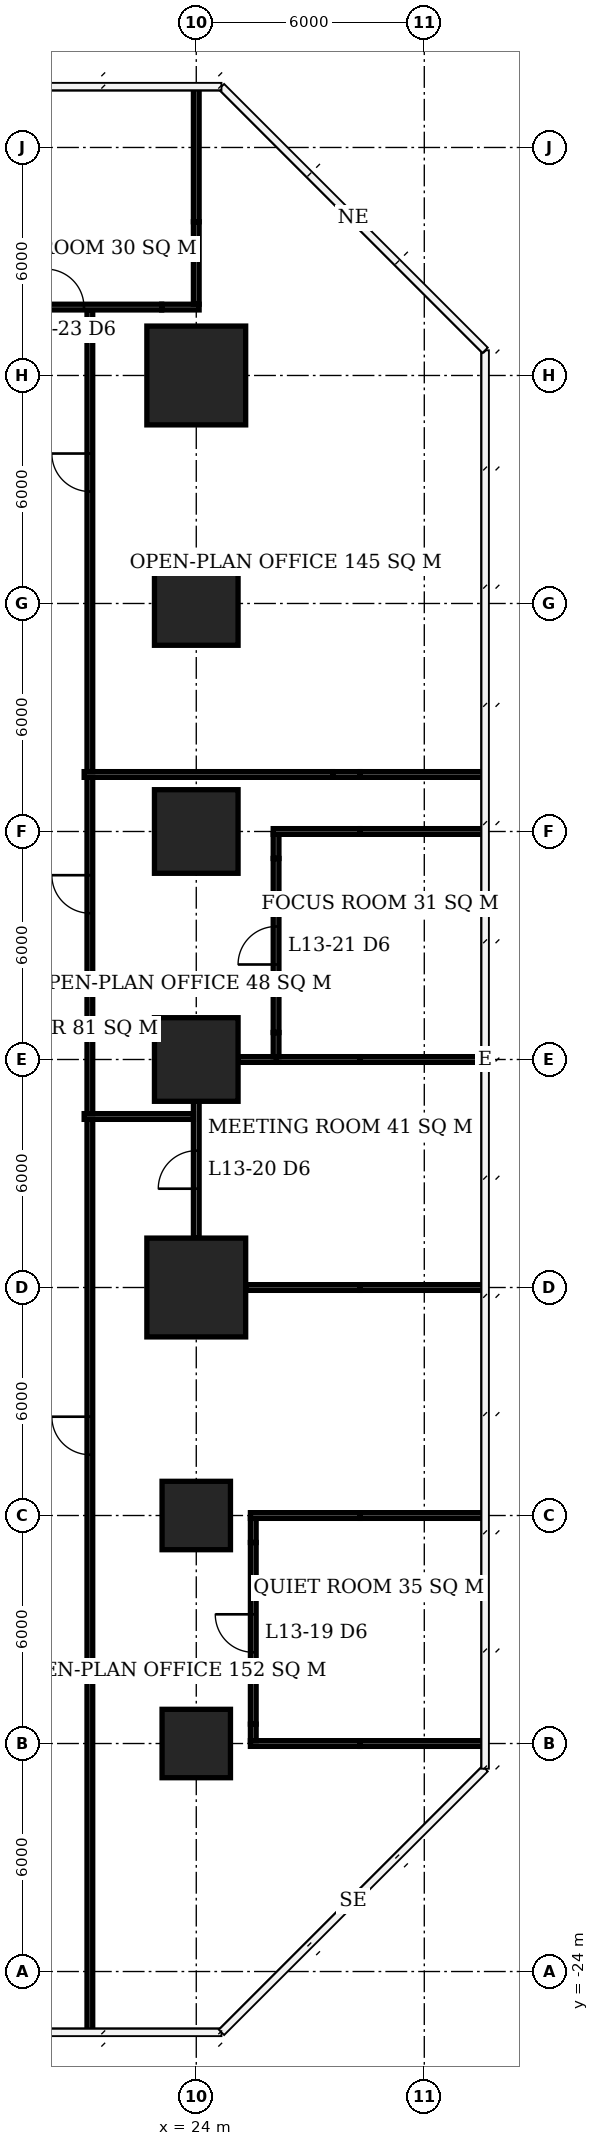
"""IFC4 building model, lengths in metres.
Left out: names, types, materials, properties, quantities, classifications, styles, units other than length and angle.
Written with IfcOpenShell. Run it as: python <this file> out.ifc"""

import sys

from ifc_helpers import new_model, si_unit, direction, frame, frame_2d, origin, origin_2d, place, context, subcontext, project, spatial, rectangle, extrude, element, fill, save


model = new_model("IFC4")
c1 = context("Model", 3, precision=1e-05, world=origin(), true_north=direction((0.0, 1.0)))
c2 = subcontext(c1, "Body", "Model", "MODEL_VIEW")
j1 = project(units=[si_unit("LENGTHUNIT", "METRE"), si_unit("PLANEANGLEUNIT", "RADIAN")], contexts=[c1])
p1 = place(None, origin())
s1 = spatial("IfcSite", under=j1, at=p1, CompositionType="ELEMENT")
p2 = place(p1, origin())
s2 = spatial("IfcBuilding", under=s1, at=p2, CompositionType="ELEMENT")
p3 = place(p2, frame((0.0, 0.0, 57.2)))
s3 = spatial("IfcBuildingStorey", under=s2, at=p3, CompositionType="ELEMENT", Elevation=57.2)
for number, where, z_axis, x_axis in (
    (1, (24.0, -18.0, 0.0), (0.0, 0.0, 1.0), (1.0, 0.0, 0.0)),
    (2, (24.0, -12.0, 0.0), (0.0, 0.0, 1.0), (1.0, 0.0, 0.0)),
):
    element("IfcColumn", number, at=place(p3, frame(where, z_axis=z_axis, x_axis=x_axis)), inside=s3, PredefinedType="COLUMN", context=c2, shape_type="SweptSolid", body=[
        extrude(rectangle(XDim=1.8, YDim=1.8, at=origin_2d()), origin(), (0.0, 0.0, 1.0), 3.9),
    ])
p4 = place(p3, frame((24.0, -6.0, 0.0), z_axis=(0.0, 0.0, 1.0), x_axis=(1.0, 0.0, 0.0)))
e3 = element("IfcColumn", 3, at=p4, inside=s3, PredefinedType="COLUMN", context=c2, shape_type="SweptSolid", body=[
    extrude(rectangle(XDim=2.6, YDim=2.6, at=origin_2d()), origin(), (0.0, 0.0, 1.0), 3.9),
])
for number, where, z_axis, x_axis in (
    (4, (24.0, 0.0, 0.0), (0.0, 0.0, 1.0), (1.0, 0.0, 0.0)),
    (5, (24.0, 6.0, 0.0), (0.0, 0.0, 1.0), (1.0, 0.0, 0.0)),
    (6, (24.0, 12.0, 0.0), (0.0, 0.0, 1.0), (1.0, 0.0, 0.0)),
):
    element("IfcColumn", number, at=place(p3, frame(where, z_axis=z_axis, x_axis=x_axis)), inside=s3, PredefinedType="COLUMN", context=c2, shape_type="SweptSolid", body=[
        extrude(rectangle(XDim=2.2, YDim=2.2, at=origin_2d()), origin(), (0.0, 0.0, 1.0), 3.9),
    ])
p5 = place(p3, frame((24.0, 18.0, 0.0), z_axis=(0.0, 0.0, 1.0), x_axis=(1.0, 0.0, 0.0)))
e7 = element("IfcColumn", 7, at=p5, inside=s3, PredefinedType="COLUMN", context=c2, shape_type="SweptSolid", body=[
    extrude(rectangle(XDim=2.6, YDim=2.6, at=origin_2d()), origin(), (0.0, 0.0, 1.0), 3.9),
])
p6 = place(p3, frame((25.425, -18.0, 0.0), z_axis=(0.0, 0.0, 1.0), x_axis=(1.0, 0.0, 0.0)))
e8 = element("IfcWall", 8, at=p6, inside=s3, PredefinedType="PARTITIONING", context=c2, shape_type="SweptSolid", body=[
    extrude(rectangle(XDim=2.885, YDim=0.15, at=frame_2d((1.442, 0.0))), origin(), (0.0, 0.0, 1.0), 2.65),
])
p7 = place(p3, frame((28.31, -18.0, 0.0), z_axis=(0.0, 0.0, 1.0), x_axis=(1.0, 0.0, 0.0)))
e9 = element("IfcWall", 9, at=p7, inside=s3, PredefinedType="PARTITIONING", context=c2, shape_type="SweptSolid", body=[
    extrude(rectangle(XDim=3.29, YDim=0.15, at=frame_2d((1.645, 0.0))), origin(), (0.0, 0.0, 1.0), 3.65),
])
p8 = place(p3, frame((25.425, -12.0, 0.0), z_axis=(0.0, 0.0, 1.0), x_axis=(1.0, 0.0, 0.0)))
e10 = element("IfcWall", 10, at=p8, inside=s3, PredefinedType="PARTITIONING", context=c2, shape_type="SweptSolid", body=[
    extrude(rectangle(XDim=2.885, YDim=0.15, at=frame_2d((1.442, 0.0))), origin(), (0.0, 0.0, 1.0), 2.65),
])
p9 = place(p3, frame((28.31, -12.0, 0.0), z_axis=(0.0, 0.0, 1.0), x_axis=(1.0, 0.0, 0.0)))
e11 = element("IfcWall", 11, at=p9, inside=s3, PredefinedType="PARTITIONING", context=c2, shape_type="SweptSolid", body=[
    extrude(rectangle(XDim=3.29, YDim=0.15, at=frame_2d((1.645, 0.0))), origin(), (0.0, 0.0, 1.0), 3.65),
])
p10 = place(p3, frame((25.3, -6.0, 0.0), z_axis=(0.0, 0.0, 1.0), x_axis=(1.0, 0.0, 0.0)))
e12 = element("IfcWall", 12, at=p10, inside=s3, PredefinedType="PARTITIONING", context=c2, shape_type="SweptSolid", body=[
    extrude(rectangle(XDim=3.01, YDim=0.15, at=frame_2d((1.505, 0.0))), origin(), (0.0, 0.0, 1.0), 2.65),
])
p11 = place(p3, frame((28.31, -6.0, 0.0), z_axis=(0.0, 0.0, 1.0), x_axis=(1.0, 0.0, 0.0)))
e13 = element("IfcWall", 13, at=p11, inside=s3, PredefinedType="PARTITIONING", context=c2, shape_type="SweptSolid", body=[
    extrude(rectangle(XDim=3.29, YDim=0.15, at=frame_2d((1.645, 0.0))), origin(), (0.0, 0.0, 1.0), 3.65),
])
p12 = place(p3, frame((25.1, 0.0, 0.0), z_axis=(0.0, 0.0, 1.0), x_axis=(1.0, 0.0, 0.0)))
e14 = element("IfcWall", 14, at=p12, inside=s3, PredefinedType="PARTITIONING", context=c2, shape_type="SweptSolid", body=[
    extrude(rectangle(XDim=1.075, YDim=0.15, at=frame_2d((0.538, 0.0))), origin(), (0.0, 0.0, 1.0), 2.65),
])
p13 = place(p3, frame((26.1, 0.0, 0.0), z_axis=(0.0, 0.0, 1.0), x_axis=(1.0, 0.0, 0.0)))
e15 = element("IfcWall", 15, at=p13, inside=s3, PredefinedType="PARTITIONING", context=c2, shape_type="SweptSolid", body=[
    extrude(rectangle(XDim=2.21, YDim=0.15, at=frame_2d((1.105, 0.0))), origin(), (0.0, 0.0, 1.0), 2.65),
])
p14 = place(p3, frame((28.31, 0.0, 0.0), z_axis=(0.0, 0.0, 1.0), x_axis=(1.0, 0.0, 0.0)))
e16 = element("IfcWall", 16, at=p14, inside=s3, PredefinedType="PARTITIONING", context=c2, shape_type="SweptSolid", body=[
    extrude(rectangle(XDim=3.24, YDim=0.15, at=frame_2d((1.62, 0.0))), origin(), (0.0, 0.0, 1.0), 3.65),
])
p15 = place(p3, frame((26.025, 6.0, 0.0), z_axis=(0.0, 0.0, 1.0), x_axis=(1.0, 0.0, 0.0)))
e17 = element("IfcWall", 17, at=p15, inside=s3, PredefinedType="PARTITIONING", context=c2, shape_type="SweptSolid", body=[
    extrude(rectangle(XDim=2.285, YDim=0.15, at=frame_2d((1.143, 0.0))), origin(), (0.0, 0.0, 1.0), 2.65),
])
p16 = place(p3, frame((28.31, 6.0, 0.0), z_axis=(0.0, 0.0, 1.0), x_axis=(1.0, 0.0, 0.0)))
e18 = element("IfcWall", 18, at=p16, inside=s3, PredefinedType="PARTITIONING", context=c2, shape_type="SweptSolid", body=[
    extrude(rectangle(XDim=3.29, YDim=0.15, at=frame_2d((1.645, 0.0))), origin(), (0.0, 0.0, 1.0), 3.65),
])
p17 = place(p3, frame((18.075, 19.8, 0.0), z_axis=(0.0, 0.0, 1.0), x_axis=(1.0, 0.0, 0.0)))
e19 = element("IfcWall", 19, at=p17, inside=s3, PredefinedType="PARTITIONING", context=c2, shape_type="SweptSolid", body=[
    extrude(rectangle(XDim=5.015, YDim=0.15, at=frame_2d((2.508, 0.0))), origin(), (0.0, 0.0, 1.0), 3.65),
])
p18 = place(p17, frame((1.97, 0.0, 0.0)))
e20 = element("IfcOpeningElement", 20, at=p18, cuts=e19, PredefinedType="OPENING", context=c2, shape_type="SweptSolid", body=[
    extrude(rectangle(XDim=1.0, YDim=2.1, at=frame_2d((0.5, 1.05))), frame((0.0, 0.085, 0.0), z_axis=(0.0, -1.0, 0.0), x_axis=(1.0, 0.0, 0.0)), (0.0, 0.0, 1.0), 0.17),
])
p19 = place(p3, frame((23.09, 19.8, 0.0), z_axis=(0.0, 0.0, 1.0), x_axis=(1.0, 0.0, 0.0)))
e21 = element("IfcWall", 21, at=p19, inside=s3, PredefinedType="PARTITIONING", context=c2, shape_type="SweptSolid", body=[
    extrude(rectangle(XDim=0.985, YDim=0.15, at=frame_2d((0.492, 0.0))), origin(), (0.0, 0.0, 1.0), 2.65),
])
p20 = place(p3, frame((24.0, -4.7, 0.0), z_axis=(0.0, 0.0, 1.0), x_axis=(0.0, 1.0, 0.0)))
e22 = element("IfcWall", 22, at=p20, inside=s3, PredefinedType="PARTITIONING", context=c2, shape_type="SweptSolid", body=[
    extrude(rectangle(XDim=3.6, YDim=0.15, at=frame_2d((1.8, 0.0))), origin(), (0.0, 0.0, 1.0), 3.65),
])
p21 = place(p20, frame((1.3, 0.0, 0.0)))
e23 = element("IfcOpeningElement", 23, at=p21, cuts=e22, PredefinedType="OPENING", context=c2, shape_type="SweptSolid", body=[
    extrude(rectangle(XDim=1.0, YDim=2.1, at=frame_2d((0.5, 1.05))), frame((0.0, 0.085, 0.0), z_axis=(0.0, -1.0, 0.0), x_axis=(1.0, 0.0, 0.0)), (0.0, 0.0, 1.0), 0.17),
])
p22 = place(p3, frame((24.0, 19.875, 0.0), z_axis=(0.0, 0.0, 1.0), x_axis=(0.0, 1.0, 0.0)))
e24 = element("IfcWall", 24, at=p22, inside=s3, PredefinedType="PARTITIONING", context=c2, shape_type="SweptSolid", body=[
    extrude(rectangle(XDim=2.17, YDim=0.15, at=frame_2d((1.085, 0.0))), origin(), (0.0, 0.0, 1.0), 2.65),
])
p23 = place(p3, frame((24.0, 22.045, 0.0), z_axis=(0.0, 0.0, 1.0), x_axis=(0.0, 1.0, 0.0)))
e25 = element("IfcWall", 25, at=p23, inside=s3, PredefinedType="PARTITIONING", context=c2, shape_type="SweptSolid", body=[
    extrude(rectangle(XDim=3.555, YDim=0.15, at=frame_2d((1.778, 0.0))), origin(), (0.0, 0.0, 1.0), 3.65),
])
p24 = place(p3, frame((25.5, -17.925, 0.0), z_axis=(0.0, 0.0, 1.0), x_axis=(0.0, 1.0, 0.0)))
e26 = element("IfcWall", 26, at=p24, inside=s3, PredefinedType="PARTITIONING", context=c2, shape_type="SweptSolid", body=[
    extrude(rectangle(XDim=0.435, YDim=0.15, at=frame_2d((0.218, 0.0))), origin(), (0.0, 0.0, 1.0), 2.65),
])
p25 = place(p3, frame((25.5, -17.49, 0.0), z_axis=(0.0, 0.0, 1.0), x_axis=(0.0, 1.0, 0.0)))
e27 = element("IfcWall", 27, at=p25, inside=s3, PredefinedType="PARTITIONING", context=c2, shape_type="SweptSolid", body=[
    extrude(rectangle(XDim=4.78, YDim=0.15, at=frame_2d((2.39, 0.0))), origin(), (0.0, 0.0, 1.0), 3.65),
])
p26 = place(p25, frame((1.89, 0.0, 0.0)))
e28 = element("IfcOpeningElement", 28, at=p26, cuts=e27, PredefinedType="OPENING", context=c2, shape_type="SweptSolid", body=[
    extrude(rectangle(XDim=1.0, YDim=2.1, at=frame_2d((0.5, 1.05))), frame((0.0, 0.085, 0.0), z_axis=(0.0, -1.0, 0.0), x_axis=(1.0, 0.0, 0.0)), (0.0, 0.0, 1.0), 0.17),
])
for number, where, z_axis, x_axis in (
    (29, (25.5, -12.71, 0.0), (0.0, 0.0, 1.0), (0.0, 1.0, 0.0)),
    (30, (26.1, 0.075, 0.0), (0.0, 0.0, 1.0), (0.0, 1.0, 0.0)),
):
    element("IfcWall", number, at=place(p3, frame(where, z_axis=z_axis, x_axis=x_axis)), inside=s3, PredefinedType="PARTITIONING", context=c2, shape_type="SweptSolid", body=[
        extrude(rectangle(XDim=0.635, YDim=0.15, at=frame_2d((0.317, 0.0))), origin(), (0.0, 0.0, 1.0), 2.65),
    ])
p27 = place(p3, frame((26.1, 0.71, 0.0), z_axis=(0.0, 0.0, 1.0), x_axis=(0.0, 1.0, 0.0)))
e31 = element("IfcWall", 31, at=p27, inside=s3, PredefinedType="PARTITIONING", context=c2, shape_type="SweptSolid", body=[
    extrude(rectangle(XDim=4.58, YDim=0.15, at=frame_2d((2.29, 0.0))), origin(), (0.0, 0.0, 1.0), 3.65),
])
p28 = place(p27, frame((1.79, 0.0, 0.0)))
e32 = element("IfcOpeningElement", 32, at=p28, cuts=e31, PredefinedType="OPENING", context=c2, shape_type="SweptSolid", body=[
    extrude(rectangle(XDim=1.0, YDim=2.1, at=frame_2d((0.5, 1.05))), frame((0.0, 0.085, 0.0), z_axis=(0.0, -1.0, 0.0), x_axis=(1.0, 0.0, 0.0)), (0.0, 0.0, 1.0), 0.17),
])
p29 = place(p3, frame((26.1, 5.29, 0.0), z_axis=(0.0, 0.0, 1.0), x_axis=(0.0, 1.0, 0.0)))
e33 = element("IfcWall", 33, at=p29, inside=s3, PredefinedType="PARTITIONING", context=c2, shape_type="SweptSolid", body=[
    extrude(rectangle(XDim=0.635, YDim=0.15, at=frame_2d((0.317, 0.0))), origin(), (0.0, 0.0, 1.0), 2.65),
])
p30 = place(p3, frame((21.2, -25.6, 0.0), z_axis=(0.0, 0.0, 1.0), x_axis=(0.0, 1.0, 0.0)))
e34 = element("IfcWall", 34, at=p30, inside=s3, PredefinedType="PARTITIONING", context=c2, shape_type="SweptSolid", body=[
    extrude(rectangle(XDim=24.025, YDim=0.15, at=frame_2d((12.013, 0.0))), origin(), (0.0, 0.0, 1.0), 3.65),
])
p31 = place(p30, frame((15.2, 0.0, 0.0)))
e35 = element("IfcOpeningElement", 35, at=p31, cuts=e34, PredefinedType="OPENING", context=c2, shape_type="SweptSolid", body=[
    extrude(rectangle(XDim=1.0, YDim=2.1, at=frame_2d((0.5, 1.05))), frame((0.0, 0.085, 0.0), z_axis=(0.0, -1.0, 0.0), x_axis=(1.0, 0.0, 0.0)), (0.0, 0.0, 1.0), 0.17),
])
p32 = place(p3, frame((21.2, -1.425, 0.0), z_axis=(0.0, 0.0, 1.0), x_axis=(0.0, 1.0, 0.0)))
e36 = element("IfcWall", 36, at=p32, inside=s3, PredefinedType="PARTITIONING", context=c2, shape_type="SweptSolid", body=[
    extrude(rectangle(XDim=8.85, YDim=0.15, at=frame_2d((4.425, 0.0))), origin(), (0.0, 0.0, 1.0), 3.65),
])
p33 = place(p32, frame((5.275, 0.0, 0.0)))
e37 = element("IfcOpeningElement", 37, at=p33, cuts=e36, PredefinedType="OPENING", context=c2, shape_type="SweptSolid", body=[
    extrude(rectangle(XDim=1.0, YDim=2.1, at=frame_2d((0.5, 1.05))), frame((0.0, 0.085, 0.0), z_axis=(0.0, -1.0, 0.0), x_axis=(1.0, 0.0, 0.0)), (0.0, 0.0, 1.0), 0.17),
])
p34 = place(p3, frame((21.05, -1.5, 0.0), z_axis=(0.0, 0.0, 1.0), x_axis=(1.0, 0.0, 0.0)))
e38 = element("IfcWall", 38, at=p34, inside=s3, PredefinedType="PARTITIONING", context=c2, shape_type="SweptSolid", body=[
    extrude(rectangle(XDim=2.875, YDim=0.15, at=frame_2d((1.438, 0.0))), origin(), (0.0, 0.0, 1.0), 3.65),
])
p35 = place(p3, frame((21.2, 7.575, 0.0), z_axis=(0.0, 0.0, 1.0), x_axis=(0.0, 1.0, 0.0)))
e39 = element("IfcWall", 39, at=p35, inside=s3, PredefinedType="PARTITIONING", context=c2, shape_type="SweptSolid", body=[
    extrude(rectangle(XDim=12.15, YDim=0.15, at=frame_2d((6.075, 0.0))), origin(), (0.0, 0.0, 1.0), 3.65),
])
p36 = place(p35, frame((7.371, 0.0, 0.0)))
e40 = element("IfcOpeningElement", 40, at=p36, cuts=e39, PredefinedType="OPENING", context=c2, shape_type="SweptSolid", body=[
    extrude(rectangle(XDim=1.0, YDim=2.1, at=frame_2d((0.5, 1.05))), frame((0.0, 0.085, 0.0), z_axis=(0.0, -1.0, 0.0), x_axis=(1.0, 0.0, 0.0)), (0.0, 0.0, 1.0), 0.17),
])
p37 = place(p3, frame((21.05, 7.5, 0.0), z_axis=(0.0, 0.0, 1.0), x_axis=(1.0, 0.0, 0.0)))
e41 = element("IfcWall", 41, at=p37, inside=s3, PredefinedType="PARTITIONING", context=c2, shape_type="SweptSolid", body=[
    extrude(rectangle(XDim=6.54, YDim=0.15, at=frame_2d((3.27, 0.0))), origin(), (0.0, 0.0, 1.0), 3.65),
])
p38 = place(p3, frame((27.59, 7.5, 0.0), z_axis=(0.0, 0.0, 1.0), x_axis=(1.0, 0.0, 0.0)))
e42 = element("IfcWall", 42, at=p38, inside=s3, PredefinedType="PARTITIONING", context=c2, shape_type="SweptSolid", body=[
    extrude(rectangle(XDim=0.72, YDim=0.15, at=frame_2d((0.36, 0.0))), origin(), (0.0, 0.0, 1.0), 2.65),
])
p39 = place(p3, frame((28.31, 7.5, 0.0), z_axis=(0.0, 0.0, 1.0), x_axis=(1.0, 0.0, 0.0)))
e43 = element("IfcWall", 43, at=p39, inside=s3, PredefinedType="PARTITIONING", context=c2, shape_type="SweptSolid", body=[
    extrude(rectangle(XDim=3.29, YDim=0.15, at=frame_2d((1.645, 0.0))), origin(), (0.0, 0.0, 1.0), 3.65),
])
p40 = place(p26, origin())
e44 = element("IfcDoor", 44, at=p40, inside=s3, OperationType="SINGLE_SWING_RIGHT", PredefinedType="DOOR", context=c2, shape_type="SweptSolid", body=[
    extrude(rectangle(XDim=1.0, YDim=2.1, at=frame_2d((0.5, 1.05))), frame((0.0, 0.025, 0.0), z_axis=(0.0, -1.0, 0.0), x_axis=(1.0, 0.0, 0.0)), (0.0, 0.0, 1.0), 0.05),
])
fill(e28, e44)
p41 = place(p21, origin())
e45 = element("IfcDoor", 45, at=p41, inside=s3, OperationType="SINGLE_SWING_LEFT", PredefinedType="DOOR", context=c2, shape_type="SweptSolid", body=[
    extrude(rectangle(XDim=1.0, YDim=2.1, at=frame_2d((0.5, 1.05))), frame((0.0, 0.025, 0.0), z_axis=(0.0, -1.0, 0.0), x_axis=(1.0, 0.0, 0.0)), (0.0, 0.0, 1.0), 0.05),
])
fill(e23, e45)
p42 = place(p28, origin())
e46 = element("IfcDoor", 46, at=p42, inside=s3, OperationType="SINGLE_SWING_LEFT", PredefinedType="DOOR", context=c2, shape_type="SweptSolid", body=[
    extrude(rectangle(XDim=1.0, YDim=2.1, at=frame_2d((0.5, 1.05))), frame((0.0, 0.025, 0.0), z_axis=(0.0, -1.0, 0.0), x_axis=(1.0, 0.0, 0.0)), (0.0, 0.0, 1.0), 0.05),
])
fill(e32, e46)
p43 = place(p18, origin())
e47 = element("IfcDoor", 47, at=p43, inside=s3, OperationType="SINGLE_SWING_LEFT", PredefinedType="DOOR", context=c2, shape_type="SweptSolid", body=[
    extrude(rectangle(XDim=1.0, YDim=2.1, at=frame_2d((0.5, 1.05))), frame((0.0, 0.025, 0.0), z_axis=(0.0, -1.0, 0.0), x_axis=(1.0, 0.0, 0.0)), (0.0, 0.0, 1.0), 0.05),
])
fill(e20, e47)
p44 = place(p31, origin())
e48 = element("IfcDoor", 48, at=p44, inside=s3, OperationType="SINGLE_SWING_RIGHT", PredefinedType="DOOR", context=c2, shape_type="SweptSolid", body=[
    extrude(rectangle(XDim=1.0, YDim=2.1, at=frame_2d((0.5, 1.05))), frame((0.0, 0.025, 0.0), z_axis=(0.0, -1.0, 0.0), x_axis=(1.0, 0.0, 0.0)), (0.0, 0.0, 1.0), 0.05),
])
fill(e35, e48)
p45 = place(p33, origin())
e49 = element("IfcDoor", 49, at=p45, inside=s3, OperationType="SINGLE_SWING_RIGHT", PredefinedType="DOOR", context=c2, shape_type="SweptSolid", body=[
    extrude(rectangle(XDim=1.0, YDim=2.1, at=frame_2d((0.5, 1.05))), frame((0.0, 0.025, 0.0), z_axis=(0.0, -1.0, 0.0), x_axis=(1.0, 0.0, 0.0)), (0.0, 0.0, 1.0), 0.05),
])
fill(e37, e49)
p46 = place(p36, origin())
e50 = element("IfcDoor", 50, at=p46, inside=s3, OperationType="SINGLE_SWING_RIGHT", PredefinedType="DOOR", context=c2, shape_type="SweptSolid", body=[
    extrude(rectangle(XDim=1.0, YDim=2.1, at=frame_2d((0.5, 1.05))), frame((0.0, 0.025, 0.0), z_axis=(0.0, -1.0, 0.0), x_axis=(1.0, 0.0, 0.0)), (0.0, 0.0, 1.0), 0.05),
])
fill(e40, e50)
save(model, sys.argv[1])
